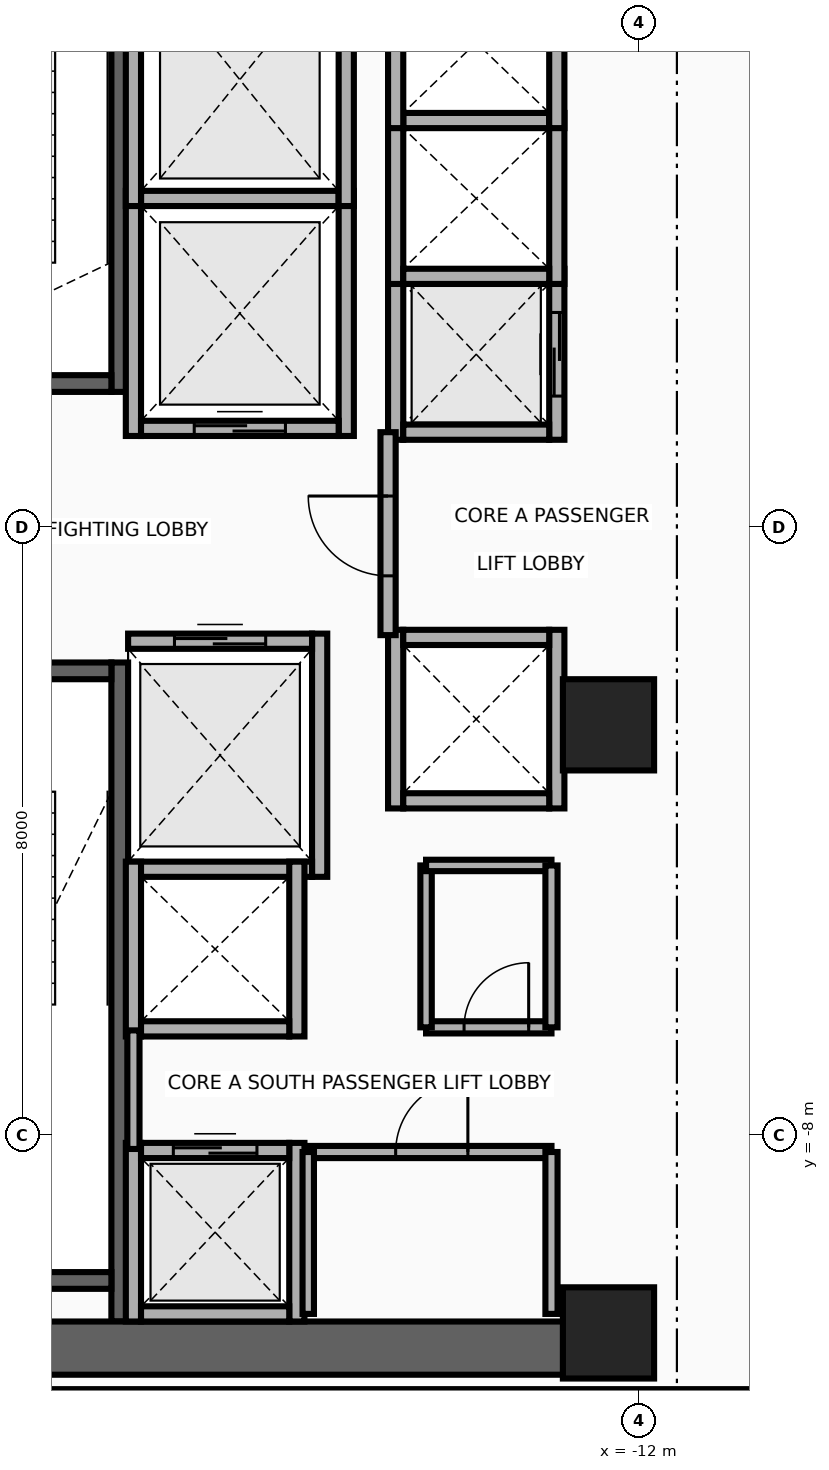
"""IFC4 building model, lengths in metres.
Left out: names, types, materials, properties, quantities, classifications, styles, units other than length and angle.
Written with IfcOpenShell. Run it as: python <this file> out.ifc"""

import sys

from ifc_helpers import new_model, si_unit, direction, frame, frame_2d, origin, origin_2d, place, context, subcontext, project, spatial, rectangle, extrude, source, transform, mapped, element, fill, save


model = new_model("IFC4")
c1 = context("Model", 3, precision=1e-05, world=origin(), true_north=direction((0.0, 1.0)))
c2 = subcontext(c1, "Body", "Model", "MODEL_VIEW")
j1 = project(units=[si_unit("LENGTHUNIT", "METRE"), si_unit("PLANEANGLEUNIT", "RADIAN")], contexts=[c1])
p1 = place(None, origin())
s1 = spatial("IfcSite", under=j1, at=p1, CompositionType="ELEMENT")
p2 = place(p1, origin())
s2 = spatial("IfcBuilding", under=s1, at=p2, CompositionType="ELEMENT")
p3 = place(p2, frame((0.0, 0.0, 135.3)))
s3 = spatial("IfcBuildingStorey", under=s2, at=p3, CompositionType="ELEMENT", Elevation=135.3)
p4 = place(p3, frame((-18.83, 1.78, 0.0), z_axis=(0.0, 0.0, 1.0), x_axis=(0.0, 1.0, 0.0)))
e1 = element("IfcWall", 1, at=p4, inside=s3, PredefinedType="SHEAR", context=c2, shape_type="SweptSolid", body=[
    extrude(rectangle(XDim=8.67, YDim=0.22, at=frame_2d((4.335, 0.0))), origin(), (0.0, 0.0, 1.0), 3.46),
])
p5 = place(p3, frame((-22.05, 1.89, 0.0), z_axis=(0.0, 0.0, 1.0), x_axis=(1.0, 0.0, 0.0)))
e2 = element("IfcWall", 2, at=p5, inside=s3, PredefinedType="SHEAR", context=c2, shape_type="SweptSolid", body=[
    extrude(rectangle(XDim=3.11, YDim=0.22, at=frame_2d((1.555, 0.0))), origin(), (0.0, 0.0, 1.0), 3.46),
])
p6 = place(p5, frame((1.0, 0.0, 0.0)))
e3 = element("IfcOpeningElement", 3, at=p6, cuts=e2, PredefinedType="OPENING", context=c2, shape_type="SweptSolid", body=[
    extrude(rectangle(XDim=1.1, YDim=2.15, at=frame_2d((0.55, 1.075))), frame((0.0, 0.125, 0.0), z_axis=(0.0, -1.0, 0.0), x_axis=(1.0, 0.0, 0.0)), (0.0, 0.0, 1.0), 0.25),
])
p7 = place(p3, frame((-18.83, -10.45, 0.0), z_axis=(0.0, 0.0, 1.0), x_axis=(0.0, 1.0, 0.0)))
e4 = element("IfcWall", 4, at=p7, inside=s3, PredefinedType="SHEAR", context=c2, shape_type="SweptSolid", body=[
    extrude(rectangle(XDim=8.67, YDim=0.22, at=frame_2d((4.335, 0.0))), origin(), (0.0, 0.0, 1.0), 3.46),
])
p8 = place(p3, frame((-22.05, -9.91, 0.0), z_axis=(0.0, 0.0, 1.0), x_axis=(1.0, 0.0, 0.0)))
e5 = element("IfcWall", 5, at=p8, inside=s3, PredefinedType="SHEAR", context=c2, shape_type="SweptSolid", body=[
    extrude(rectangle(XDim=3.11, YDim=0.22, at=frame_2d((1.555, 0.0))), origin(), (0.0, 0.0, 1.0), 3.46),
])
p9 = place(p3, frame((-22.05, -1.89, 0.0), z_axis=(0.0, 0.0, 1.0), x_axis=(1.0, 0.0, 0.0)))
e6 = element("IfcWall", 6, at=p9, inside=s3, PredefinedType="SHEAR", context=c2, shape_type="SweptSolid", body=[
    extrude(rectangle(XDim=3.11, YDim=0.22, at=frame_2d((1.555, 0.0))), origin(), (0.0, 0.0, 1.0), 3.46),
])
p10 = place(p9, frame((1.0, 0.0, 0.0)))
e7 = element("IfcOpeningElement", 7, at=p10, cuts=e6, PredefinedType="OPENING", context=c2, shape_type="SweptSolid", body=[
    extrude(rectangle(XDim=1.1, YDim=2.15, at=frame_2d((0.55, 1.075))), frame((0.0, 0.125, 0.0), z_axis=(0.0, -1.0, 0.0), x_axis=(1.0, 0.0, 0.0)), (0.0, 0.0, 1.0), 0.25),
])
p11 = place(p3, frame((-22.65, -10.8, 0.0), z_axis=(0.0, 0.0, 1.0), x_axis=(1.0, 0.0, 0.0)))
e8 = element("IfcWall", 8, at=p11, inside=s3, PredefinedType="SHEAR", context=c2, shape_type="SweptSolid", body=[
    extrude(rectangle(XDim=10.25, YDim=0.7, at=frame_2d((5.125, 0.0))), origin(), (0.0, 0.0, 1.0), 3.46),
])
m1 = source(origin(), c2, "Body", "SweptSolid", [
    extrude(rectangle(XDim=1.2, YDim=1.2, at=origin_2d()), origin(), (0.0, 0.0, 1.0), 3.7),
])
for number, where, z_axis, x_axis in (
    (9, (-12.4, -10.6, 0.0), (0.0, 0.0, 1.0), (1.0, 0.0, 0.0)),
    (10, (-12.4, -2.6, 0.0), (0.0, 0.0, 1.0), (1.0, 0.0, 0.0)),
):
    element("IfcColumn", number, at=place(p3, frame(where, z_axis=z_axis, x_axis=x_axis)), inside=s3, PredefinedType="COLUMN", context=c2, shape_type="MappedRepresentation", body=[
        mapped(m1, transform((0.0, 0.0, 0.0), x_axis=(1.0, 0.0, 0.0), y_axis=(0.0, 1.0, 0.0), z_axis=(0.0, 0.0, 1.0), scale=1.0)),
    ])
for number, where, z_axis, x_axis in (
    (11, (-18.65, 1.2, 0.0), (0.0, 0.0, 1.0), (0.0, 1.0, 0.0)),
    (12, (-15.85, 1.2, 0.0), (0.0, 0.0, 1.0), (0.0, 1.0, 0.0)),
):
    element("IfcWall", number, at=place(p3, frame(where, z_axis=z_axis, x_axis=x_axis)), inside=s3, PredefinedType="MOVABLE", context=c2, shape_type="SweptSolid", body=[
        extrude(rectangle(XDim=3.225, YDim=0.2, at=frame_2d((1.613, 0.0))), origin(), (0.0, 0.0, 1.0), 3.46),
    ])
p12 = place(p3, frame((-18.55, 1.3, 0.0), z_axis=(0.0, 0.0, 1.0), x_axis=(1.0, 0.0, 0.0)))
e13 = element("IfcWall", 13, at=p12, inside=s3, PredefinedType="MOVABLE", context=c2, shape_type="SweptSolid", body=[
    extrude(rectangle(XDim=2.6, YDim=0.2, at=frame_2d((1.3, 0.0))), origin(), (0.0, 0.0, 1.0), 3.46),
])
p13 = place(p12, frame((0.7, 0.0, 0.0)))
e14 = element("IfcOpeningElement", 14, at=p13, cuts=e13, PredefinedType="OPENING", context=c2, shape_type="SweptSolid", body=[
    extrude(rectangle(XDim=1.2, YDim=2.1, at=frame_2d((0.6, 1.05))), frame((0.0, 0.115, 0.0), z_axis=(0.0, -1.0, 0.0), x_axis=(1.0, 0.0, 0.0)), (0.0, 0.0, 1.0), 0.23),
])
p14 = place(p3, frame((-18.55, 4.325, 0.0), z_axis=(0.0, 0.0, 1.0), x_axis=(1.0, 0.0, 0.0)))
e15 = element("IfcWall", 15, at=p14, inside=s3, PredefinedType="MOVABLE", context=c2, shape_type="SweptSolid", body=[
    extrude(rectangle(XDim=2.6, YDim=0.2, at=frame_2d((1.3, 0.0))), origin(), (0.0, 0.0, 1.0), 3.46),
])
p15 = place(p3, frame((-16.2, -4.6, 0.0), z_axis=(0.0, 0.0, 1.0), x_axis=(0.0, 1.0, 0.0)))
e16 = element("IfcWall", 16, at=p15, inside=s3, PredefinedType="MOVABLE", context=c2, shape_type="SweptSolid", body=[
    extrude(rectangle(XDim=3.2, YDim=0.2, at=frame_2d((1.6, 0.0))), origin(), (0.0, 0.0, 1.0), 3.46),
])
p16 = place(p3, frame((-18.72, -4.5, 0.0), z_axis=(0.0, 0.0, 1.0), x_axis=(1.0, 0.0, 0.0)))
e17 = element("IfcWall", 17, at=p16, inside=s3, PredefinedType="MOVABLE", context=c2, shape_type="SweptSolid", body=[
    extrude(rectangle(XDim=2.42, YDim=0.2, at=frame_2d((1.21, 0.0))), origin(), (0.0, 0.0, 1.0), 3.46),
])
p17 = place(p3, frame((-18.72, -1.5, 0.0), z_axis=(0.0, 0.0, 1.0), x_axis=(1.0, 0.0, 0.0)))
e18 = element("IfcWall", 18, at=p17, inside=s3, PredefinedType="MOVABLE", context=c2, shape_type="SweptSolid", body=[
    extrude(rectangle(XDim=2.42, YDim=0.2, at=frame_2d((1.21, 0.0))), origin(), (0.0, 0.0, 1.0), 3.46),
])
p18 = place(p17, frame((0.61, 0.0, 0.0)))
e19 = element("IfcOpeningElement", 19, at=p18, cuts=e18, PredefinedType="OPENING", context=c2, shape_type="SweptSolid", body=[
    extrude(rectangle(XDim=1.2, YDim=2.1, at=frame_2d((0.6, 1.05))), frame((0.0, 0.115, 0.0), z_axis=(0.0, -1.0, 0.0), x_axis=(1.0, 0.0, 0.0)), (0.0, 0.0, 1.0), 0.23),
])
for number, where, z_axis, x_axis in (
    (20, (-18.65, 4.225, 0.0), (0.0, 0.0, 1.0), (0.0, 1.0, 0.0)),
    (21, (-15.85, 4.225, 0.0), (0.0, 0.0, 1.0), (0.0, 1.0, 0.0)),
):
    element("IfcWall", number, at=place(p3, frame(where, z_axis=z_axis, x_axis=x_axis)), inside=s3, PredefinedType="MOVABLE", context=c2, shape_type="SweptSolid", body=[
        extrude(rectangle(XDim=3.325, YDim=0.2, at=frame_2d((1.663, 0.0))), origin(), (0.0, 0.0, 1.0), 3.46),
    ])
for number, where, z_axis, x_axis in (
    (22, (-18.65, -10.45, 0.0), (0.0, 0.0, 1.0), (0.0, 1.0, 0.0)),
    (23, (-16.5, -10.45, 0.0), (0.0, 0.0, 1.0), (0.0, 1.0, 0.0)),
):
    element("IfcWall", number, at=place(p3, frame(where, z_axis=z_axis, x_axis=x_axis)), inside=s3, PredefinedType="MOVABLE", context=c2, shape_type="SweptSolid", body=[
        extrude(rectangle(XDim=2.35, YDim=0.2, at=frame_2d((1.175, 0.0))), origin(), (0.0, 0.0, 1.0), 2.666),
    ])
p19 = place(p3, frame((-18.55, -10.35, 0.0), z_axis=(0.0, 0.0, 1.0), x_axis=(1.0, 0.0, 0.0)))
e24 = element("IfcWall", 24, at=p19, inside=s3, PredefinedType="MOVABLE", context=c2, shape_type="SweptSolid", body=[
    extrude(rectangle(XDim=1.95, YDim=0.2, at=frame_2d((0.975, 0.0))), origin(), (0.0, 0.0, 1.0), 2.666),
])
p20 = place(p3, frame((-18.55, -8.2, 0.0), z_axis=(0.0, 0.0, 1.0), x_axis=(1.0, 0.0, 0.0)))
e25 = element("IfcWall", 25, at=p20, inside=s3, PredefinedType="MOVABLE", context=c2, shape_type="SweptSolid", body=[
    extrude(rectangle(XDim=1.95, YDim=0.2, at=frame_2d((0.975, 0.0))), origin(), (0.0, 0.0, 1.0), 3.46),
])
p21 = place(p20, frame((0.425, 0.0, 0.0)))
e26 = element("IfcOpeningElement", 26, at=p21, cuts=e25, PredefinedType="OPENING", context=c2, shape_type="SweptSolid", body=[
    extrude(rectangle(XDim=1.1, YDim=2.1, at=frame_2d((0.55, 1.05))), frame((0.0, 0.115, 0.0), z_axis=(0.0, -1.0, 0.0), x_axis=(1.0, 0.0, 0.0)), (0.0, 0.0, 1.0), 0.23),
])
p22 = place(p3, frame((-15.2, 1.15, 0.0), z_axis=(0.0, 0.0, 1.0), x_axis=(0.0, 1.0, 0.0)))
e27 = element("IfcWall", 27, at=p22, inside=s3, PredefinedType="MOVABLE", context=c2, shape_type="SweptSolid", body=[
    extrude(rectangle(XDim=2.25, YDim=0.2, at=frame_2d((1.125, 0.0))), origin(), (0.0, 0.0, 1.0), 3.46),
])
p23 = place(p3, frame((-13.08, 1.15, 0.0), z_axis=(0.0, 0.0, 1.0), x_axis=(0.0, 1.0, 0.0)))
e28 = element("IfcWall", 28, at=p23, inside=s3, PredefinedType="MOVABLE", context=c2, shape_type="SweptSolid", body=[
    extrude(rectangle(XDim=2.25, YDim=0.2, at=frame_2d((1.125, 0.0))), origin(), (0.0, 0.0, 1.0), 3.46),
])
p24 = place(p23, frame((0.575, 0.0, 0.0)))
e29 = element("IfcOpeningElement", 29, at=p24, cuts=e28, PredefinedType="OPENING", context=c2, shape_type="SweptSolid", body=[
    extrude(rectangle(XDim=1.1, YDim=2.1, at=frame_2d((0.55, 1.05))), frame((0.0, 0.115, 0.0), z_axis=(0.0, -1.0, 0.0), x_axis=(1.0, 0.0, 0.0)), (0.0, 0.0, 1.0), 0.23),
])
p25 = place(p3, frame((-15.1, 1.25, 0.0), z_axis=(0.0, 0.0, 1.0), x_axis=(1.0, 0.0, 0.0)))
e30 = element("IfcWall", 30, at=p25, inside=s3, PredefinedType="MOVABLE", context=c2, shape_type="SweptSolid", body=[
    extrude(rectangle(XDim=1.92, YDim=0.2, at=frame_2d((0.96, 0.0))), origin(), (0.0, 0.0, 1.0), 3.46),
])
for number, where, z_axis, x_axis in (
    (31, (-15.2, 3.2, 0.0), (0.0, 0.0, 1.0), (0.0, 1.0, 0.0)),
    (32, (-13.08, 3.2, 0.0), (0.0, 0.0, 1.0), (0.0, 1.0, 0.0)),
):
    element("IfcWall", number, at=place(p3, frame(where, z_axis=z_axis, x_axis=x_axis)), inside=s3, PredefinedType="MOVABLE", context=c2, shape_type="SweptSolid", body=[
        extrude(rectangle(XDim=2.25, YDim=0.2, at=frame_2d((1.125, 0.0))), origin(), (0.0, 0.0, 1.0), 3.46),
    ])
for number, where, z_axis, x_axis in (
    (33, (-15.1, 3.3, 0.0), (0.0, 0.0, 1.0), (1.0, 0.0, 0.0)),
    (34, (-15.1, 5.35, 0.0), (0.0, 0.0, 1.0), (1.0, 0.0, 0.0)),
):
    element("IfcWall", number, at=place(p3, frame(where, z_axis=z_axis, x_axis=x_axis)), inside=s3, PredefinedType="MOVABLE", context=c2, shape_type="SweptSolid", body=[
        extrude(rectangle(XDim=1.92, YDim=0.2, at=frame_2d((0.96, 0.0))), origin(), (0.0, 0.0, 1.0), 3.46),
    ])
for number, where, z_axis, x_axis in (
    (35, (-15.2, 5.25, 0.0), (0.0, 0.0, 1.0), (0.0, 1.0, 0.0)),
    (36, (-13.08, 5.25, 0.0), (0.0, 0.0, 1.0), (0.0, 1.0, 0.0)),
):
    element("IfcWall", number, at=place(p3, frame(where, z_axis=z_axis, x_axis=x_axis)), inside=s3, PredefinedType="MOVABLE", context=c2, shape_type="SweptSolid", body=[
        extrude(rectangle(XDim=2.25, YDim=0.2, at=frame_2d((1.125, 0.0))), origin(), (0.0, 0.0, 1.0), 3.46),
    ])
for number, where, z_axis, x_axis in (
    (37, (-18.65, -6.7, 0.0), (0.0, 0.0, 1.0), (0.0, 1.0, 0.0)),
    (38, (-16.5, -6.7, 0.0), (0.0, 0.0, 1.0), (0.0, 1.0, 0.0)),
):
    element("IfcWall", number, at=place(p3, frame(where, z_axis=z_axis, x_axis=x_axis)), inside=s3, PredefinedType="MOVABLE", context=c2, shape_type="SweptSolid", body=[
        extrude(rectangle(XDim=2.3, YDim=0.2, at=frame_2d((1.15, 0.0))), origin(), (0.0, 0.0, 1.0), 3.46),
    ])
p26 = place(p3, frame((-18.55, -6.6, 0.0), z_axis=(0.0, 0.0, 1.0), x_axis=(1.0, 0.0, 0.0)))
e39 = element("IfcWall", 39, at=p26, inside=s3, PredefinedType="MOVABLE", context=c2, shape_type="SweptSolid", body=[
    extrude(rectangle(XDim=1.95, YDim=0.2, at=frame_2d((0.975, 0.0))), origin(), (0.0, 0.0, 1.0), 3.46),
])
for number, where, z_axis, x_axis in (
    (40, (-15.2, -3.7, 0.0), (0.0, 0.0, 1.0), (0.0, 1.0, 0.0)),
    (41, (-13.08, -3.7, 0.0), (0.0, 0.0, 1.0), (0.0, 1.0, 0.0)),
):
    element("IfcWall", number, at=place(p3, frame(where, z_axis=z_axis, x_axis=x_axis)), inside=s3, PredefinedType="MOVABLE", context=c2, shape_type="SweptSolid", body=[
        extrude(rectangle(XDim=2.35, YDim=0.2, at=frame_2d((1.175, 0.0))), origin(), (0.0, 0.0, 1.0), 3.46),
    ])
for number, where, z_axis, x_axis in (
    (42, (-15.1, -3.6, 0.0), (0.0, 0.0, 1.0), (1.0, 0.0, 0.0)),
    (43, (-15.1, -1.45, 0.0), (0.0, 0.0, 1.0), (1.0, 0.0, 0.0)),
):
    element("IfcWall", number, at=place(p3, frame(where, z_axis=z_axis, x_axis=x_axis)), inside=s3, PredefinedType="MOVABLE", context=c2, shape_type="SweptSolid", body=[
        extrude(rectangle(XDim=1.92, YDim=0.2, at=frame_2d((0.96, 0.0))), origin(), (0.0, 0.0, 1.0), 3.46),
    ])
p27 = place(p3, frame((-15.3, -1.42, 0.0), z_axis=(0.0, 0.0, 1.0), x_axis=(0.0, 1.0, 0.0)))
e44 = element("IfcWall", 44, at=p27, inside=s3, PredefinedType="PARTITIONING", context=c2, shape_type="SweptSolid", body=[
    extrude(rectangle(XDim=2.67, YDim=0.2, at=frame_2d((1.335, 0.0))), origin(), (0.0, 0.0, 1.0), 3.46),
])
p28 = place(p27, frame((0.78, 0.0, 0.0)))
e45 = element("IfcOpeningElement", 45, at=p28, cuts=e44, PredefinedType="OPENING", context=c2, shape_type="SweptSolid", body=[
    extrude(rectangle(XDim=1.05, YDim=2.15, at=frame_2d((0.525, 1.075))), frame((0.0, 0.115, 0.0), z_axis=(0.0, -1.0, 0.0), x_axis=(1.0, 0.0, 0.0)), (0.0, 0.0, 1.0), 0.23),
])
p29 = place(p3, frame((-18.65, -8.18, 0.0), z_axis=(0.0, 0.0, 1.0), x_axis=(0.0, 1.0, 0.0)))
e46 = element("IfcWall", 46, at=p29, inside=s3, PredefinedType="PARTITIONING", context=c2, shape_type="SweptSolid", body=[
    extrude(rectangle(XDim=1.56, YDim=0.16, at=frame_2d((0.78, 0.0))), origin(), (0.0, 0.0, 1.0), 3.46),
])
p30 = place(p3, frame((-16.35, -8.22, 0.0), z_axis=(0.0, 0.0, 1.0), x_axis=(1.0, 0.0, 0.0)))
e47 = element("IfcWall", 47, at=p30, inside=s3, PredefinedType="PARTITIONING", context=c2, shape_type="SweptSolid", body=[
    extrude(rectangle(XDim=3.2, YDim=0.16, at=frame_2d((1.6, 0.0))), origin(), (0.0, 0.0, 1.0), 3.46),
])
p31 = place(p30, frame((1.15, 0.0, 0.0)))
e48 = element("IfcOpeningElement", 48, at=p31, cuts=e47, PredefinedType="OPENING", context=c2, shape_type="SweptSolid", body=[
    extrude(rectangle(XDim=0.95, YDim=2.15, at=frame_2d((0.475, 1.075))), frame((0.0, 0.095, 0.0), z_axis=(0.0, -1.0, 0.0), x_axis=(1.0, 0.0, 0.0)), (0.0, 0.0, 1.0), 0.19),
])
p32 = place(p3, frame((-16.35, -10.35, 0.0), z_axis=(0.0, 0.0, 1.0), x_axis=(0.0, 1.0, 0.0)))
e49 = element("IfcWall", 49, at=p32, inside=s3, PredefinedType="PARTITIONING", context=c2, shape_type="SweptSolid", body=[
    extrude(rectangle(XDim=2.13, YDim=0.15, at=frame_2d((1.065, 0.0))), origin(), (0.0, 0.0, 1.0), 3.46),
])
p33 = place(p3, frame((-13.15, -10.35, 0.0), z_axis=(0.0, 0.0, 1.0), x_axis=(0.0, 1.0, 0.0)))
e50 = element("IfcWall", 50, at=p33, inside=s3, PredefinedType="PARTITIONING", context=c2, shape_type="SweptSolid", body=[
    extrude(rectangle(XDim=2.13, YDim=0.16, at=frame_2d((1.065, 0.0))), origin(), (0.0, 0.0, 1.0), 3.46),
])
p34 = place(p3, frame((-14.8, -6.58, 0.0), z_axis=(0.0, 0.0, 1.0), x_axis=(1.0, 0.0, 0.0)))
e51 = element("IfcWall", 51, at=p34, inside=s3, PredefinedType="PARTITIONING", context=c2, shape_type="SweptSolid", body=[
    extrude(rectangle(XDim=1.65, YDim=0.16, at=frame_2d((0.825, 0.0))), origin(), (0.0, 0.0, 1.0), 3.46),
])
p35 = place(p34, frame((0.5, 0.0, 0.0)))
e52 = element("IfcOpeningElement", 52, at=p35, cuts=e51, PredefinedType="OPENING", context=c2, shape_type="SweptSolid", body=[
    extrude(rectangle(XDim=0.85, YDim=2.05, at=frame_2d((0.425, 1.025))), frame((0.0, 0.095, 0.0), z_axis=(0.0, -1.0, 0.0), x_axis=(1.0, 0.0, 0.0)), (0.0, 0.0, 1.0), 0.19),
])
p36 = place(p3, frame((-14.8, -6.58, 0.0), z_axis=(0.0, 0.0, 1.0), x_axis=(0.0, 1.0, 0.0)))
e53 = element("IfcWall", 53, at=p36, inside=s3, PredefinedType="PARTITIONING", context=c2, shape_type="SweptSolid", body=[
    extrude(rectangle(XDim=2.13, YDim=0.15, at=frame_2d((1.065, 0.0))), origin(), (0.0, 0.0, 1.0), 3.46),
])
p37 = place(p3, frame((-14.8, -4.45, 0.0), z_axis=(0.0, 0.0, 1.0), x_axis=(1.0, 0.0, 0.0)))
e54 = element("IfcWall", 54, at=p37, inside=s3, PredefinedType="PARTITIONING", context=c2, shape_type="SweptSolid", body=[
    extrude(rectangle(XDim=1.65, YDim=0.15, at=frame_2d((0.825, 0.0))), origin(), (0.0, 0.0, 1.0), 3.46),
])
p38 = place(p3, frame((-13.15, -6.58, 0.0), z_axis=(0.0, 0.0, 1.0), x_axis=(0.0, 1.0, 0.0)))
e55 = element("IfcWall", 55, at=p38, inside=s3, PredefinedType="PARTITIONING", context=c2, shape_type="SweptSolid", body=[
    extrude(rectangle(XDim=2.13, YDim=0.16, at=frame_2d((1.065, 0.0))), origin(), (0.0, 0.0, 1.0), 3.46),
])
p39 = place(p3, frame((-23.45, -11.42, 0.0), z_axis=(0.0, 0.0, 1.0), x_axis=(1.0, 0.0, 0.0)))
e56 = element("IfcWall", 56, at=p39, inside=s3, PredefinedType="PARTITIONING", context=c2, shape_type="SweptSolid", body=[
    extrude(rectangle(XDim=13.84, YDim=0.16, at=frame_2d((6.92, 0.0))), origin(), (0.0, 0.0, 1.0), 2.834),
])
p40 = place(p13, origin())
e57 = element("IfcDoor", 57, at=p40, inside=s3, OperationType="DOUBLE_DOOR_SLIDING", PredefinedType="DOOR", context=c2, shape_type="SweptSolid", body=[
    extrude(rectangle(XDim=1.2, YDim=2.1, at=frame_2d((0.6, 1.05))), frame((0.0, 0.025, 0.0), z_axis=(0.0, -1.0, 0.0), x_axis=(1.0, 0.0, 0.0)), (0.0, 0.0, 1.0), 0.05),
])
fill(e14, e57)
p41 = place(p18, origin())
e58 = element("IfcDoor", 58, at=p41, inside=s3, OperationType="DOUBLE_DOOR_SLIDING", PredefinedType="DOOR", context=c2, shape_type="SweptSolid", body=[
    extrude(rectangle(XDim=1.2, YDim=2.1, at=frame_2d((0.6, 1.05))), frame((0.0, 0.025, 0.0), z_axis=(0.0, -1.0, 0.0), x_axis=(1.0, 0.0, 0.0)), (0.0, 0.0, 1.0), 0.05),
])
fill(e19, e58)
p42 = place(p21, origin())
e59 = element("IfcDoor", 59, at=p42, inside=s3, OperationType="DOUBLE_DOOR_SLIDING", PredefinedType="DOOR", context=c2, shape_type="SweptSolid", body=[
    extrude(rectangle(XDim=1.1, YDim=2.1, at=frame_2d((0.55, 1.05))), frame((0.0, 0.025, 0.0), z_axis=(0.0, -1.0, 0.0), x_axis=(1.0, 0.0, 0.0)), (0.0, 0.0, 1.0), 0.05),
])
fill(e26, e59)
p43 = place(p24, origin())
e60 = element("IfcDoor", 60, at=p43, inside=s3, OperationType="DOUBLE_DOOR_SLIDING", PredefinedType="DOOR", context=c2, shape_type="SweptSolid", body=[
    extrude(rectangle(XDim=1.1, YDim=2.1, at=frame_2d((0.55, 1.05))), frame((0.0, 0.025, 0.0), z_axis=(0.0, -1.0, 0.0), x_axis=(1.0, 0.0, 0.0)), (0.0, 0.0, 1.0), 0.05),
])
fill(e29, e60)
p44 = place(p28, origin())
e61 = element("IfcDoor", 61, at=p44, inside=s3, OperationType="SINGLE_SWING_RIGHT", PredefinedType="DOOR", context=c2, shape_type="SweptSolid", body=[
    extrude(rectangle(XDim=1.05, YDim=2.15, at=frame_2d((0.525, 1.075))), frame((0.0, 0.025, 0.0), z_axis=(0.0, -1.0, 0.0), x_axis=(1.0, 0.0, 0.0)), (0.0, 0.0, 1.0), 0.05),
])
fill(e45, e61)
p45 = place(p31, origin())
e62 = element("IfcDoor", 62, at=p45, inside=s3, OperationType="SINGLE_SWING_RIGHT", PredefinedType="DOOR", context=c2, shape_type="SweptSolid", body=[
    extrude(rectangle(XDim=0.95, YDim=2.15, at=frame_2d((0.475, 1.075))), frame((0.0, 0.025, 0.0), z_axis=(0.0, -1.0, 0.0), x_axis=(1.0, 0.0, 0.0)), (0.0, 0.0, 1.0), 0.05),
])
fill(e48, e62)
p46 = place(p35, origin())
e63 = element("IfcDoor", 63, at=p46, inside=s3, OperationType="SINGLE_SWING_LEFT", PredefinedType="DOOR", context=c2, shape_type="SweptSolid", body=[
    extrude(rectangle(XDim=0.85, YDim=2.05, at=frame_2d((0.425, 1.025))), frame((0.0, 0.025, 0.0), z_axis=(0.0, -1.0, 0.0), x_axis=(1.0, 0.0, 0.0)), (0.0, 0.0, 1.0), 0.05),
])
fill(e52, e63)
save(model, sys.argv[1])
